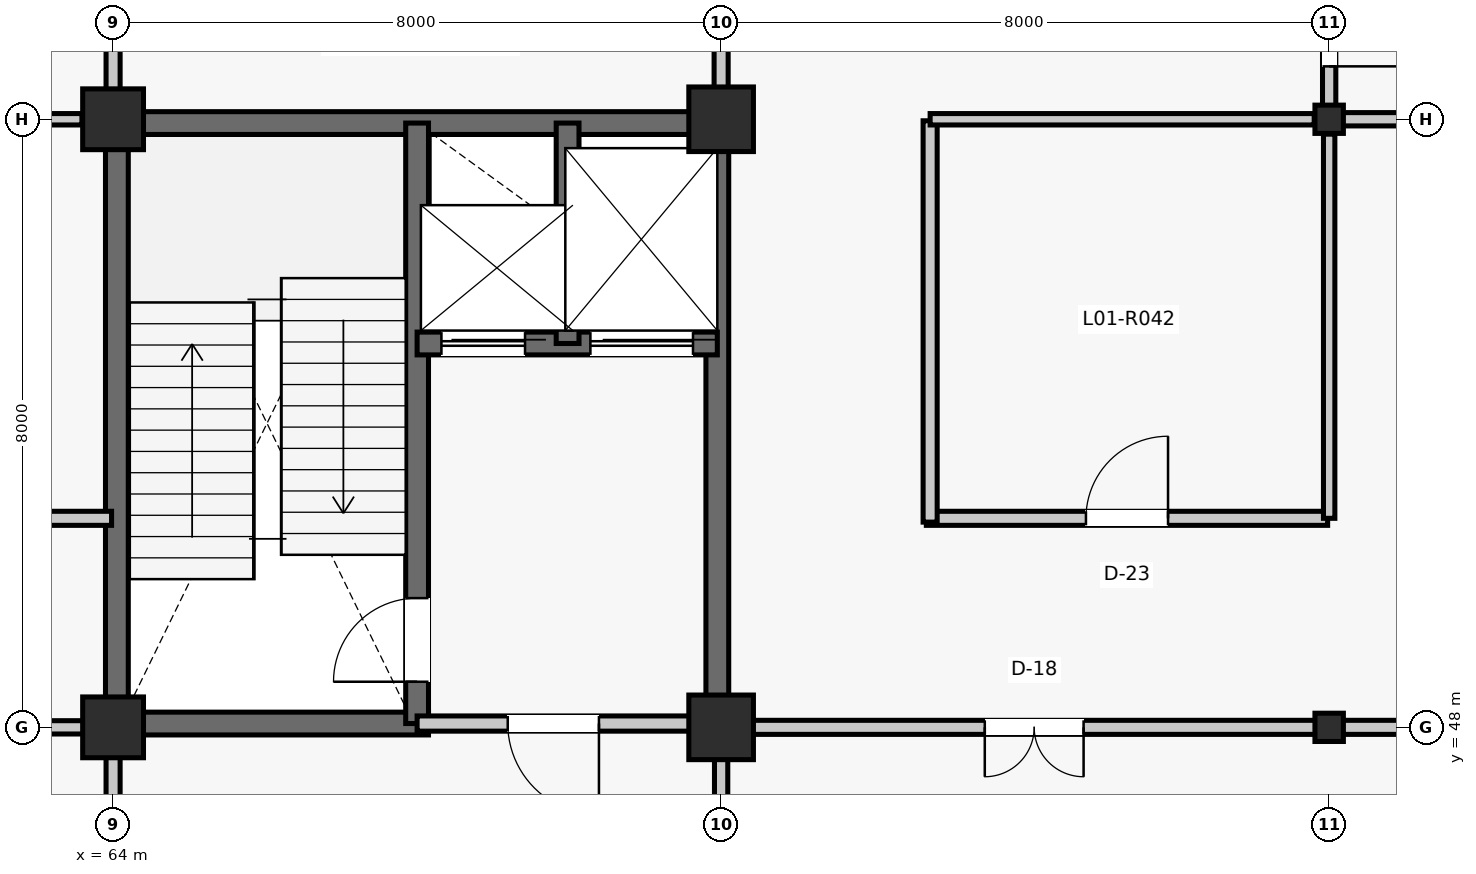
"""IFC4 building model, lengths in metres.
Left out: names, types, materials, properties, quantities, classifications, styles, units other than length and angle.
Written with IfcOpenShell. Run it as: python <this file> out.ifc"""

import sys

from ifc_helpers import new_model, si_unit, direction, frame, frame_2d, origin, origin_2d, place, context, subcontext, project, spatial, rectangle, i_section, extrude, element, fill, save


model = new_model("IFC4")
c1 = context("Model", 3, precision=1e-05, world=origin(), true_north=direction((0.0, 1.0)))
c2 = subcontext(c1, "Body", "Model", "MODEL_VIEW")
j1 = project(units=[si_unit("LENGTHUNIT", "METRE"), si_unit("PLANEANGLEUNIT", "RADIAN")], contexts=[c1])
p1 = place(None, origin())
s1 = spatial("IfcSite", under=j1, at=p1, CompositionType="ELEMENT")
p2 = place(p1, origin())
s2 = spatial("IfcBuilding", under=s1, at=p2, CompositionType="ELEMENT")
p3 = place(p2, frame((0.0, 0.0, 5.28)))
s3 = spatial("IfcBuildingStorey", under=s2, at=p3, CompositionType="ELEMENT", Elevation=5.28)
for number, where, z_axis, x_axis in (
    (1, (64.0, 48.0, 0.0), (0.0, 0.0, 1.0), (1.0, 0.0, 0.0)),
    (2, (64.0, 56.0, 0.0), (0.0, 0.0, 1.0), (1.0, 0.0, 0.0)),
):
    element("IfcColumn", number, at=place(p3, frame(where, z_axis=z_axis, x_axis=x_axis)), inside=s3, PredefinedType="COLUMN", context=c2, shape_type="SweptSolid", body=[
        extrude(rectangle(XDim=0.8, YDim=0.8, at=origin_2d()), origin(), (0.0, 0.0, 1.0), 4.62),
    ])
for number, where, z_axis, x_axis in (
    (3, (72.0, 48.0, 0.0), (0.0, 0.0, 1.0), (1.0, 0.0, 0.0)),
    (4, (72.0, 56.0, 0.0), (0.0, 0.0, 1.0), (1.0, 0.0, 0.0)),
):
    element("IfcColumn", number, at=place(p3, frame(where, z_axis=z_axis, x_axis=x_axis)), inside=s3, PredefinedType="COLUMN", context=c2, shape_type="SweptSolid", body=[
        extrude(rectangle(XDim=0.85, YDim=0.85, at=origin_2d()), origin(), (0.0, 0.0, 1.0), 4.62),
    ])
for number, where, z_axis, x_axis in (
    (5, (80.0, 48.0, 0.0), (0.0, 0.0, 1.0), (1.0, 0.0, 0.0)),
    (6, (80.0, 56.0, 0.0), (0.0, 0.0, 1.0), (1.0, 0.0, 0.0)),
):
    element("IfcColumn", number, at=place(p3, frame(where, z_axis=z_axis, x_axis=x_axis)), inside=s3, PredefinedType="COLUMN", context=c2, shape_type="SweptSolid", body=[
        extrude(i_section(OverallWidth=0.374, OverallDepth=0.372, WebThickness=0.016, FlangeThickness=0.026, FilletRadius=0.015, at=origin_2d()), origin(), (0.0, 0.0, 1.0), 4.62),
    ])
p4 = place(p3, frame((64.05, 48.29, 0.0), z_axis=(0.0, 0.0, 1.0), x_axis=(0.0, 1.0, 0.0)))
e7 = element("IfcWall", 7, at=p4, inside=s3, PredefinedType="SHEAR", context=c2, shape_type="SweptSolid", body=[
    extrude(rectangle(XDim=7.42, YDim=0.3, at=frame_2d((3.71, 0.0))), origin(), (0.0, 0.0, 1.0), 4.335),
])
p5 = place(p3, frame((64.29, 55.95, 0.0), z_axis=(0.0, 0.0, 1.0), x_axis=(1.0, 0.0, 0.0)))
e8 = element("IfcWall", 8, at=p5, inside=s3, PredefinedType="SHEAR", context=c2, shape_type="SweptSolid", body=[
    extrude(rectangle(XDim=7.395, YDim=0.3, at=frame_2d((3.698, 0.0))), origin(), (0.0, 0.0, 1.0), 4.335),
])
p6 = place(p3, frame((71.95, 48.315, 0.0), z_axis=(0.0, 0.0, 1.0), x_axis=(0.0, 1.0, 0.0)))
e9 = element("IfcWall", 9, at=p6, inside=s3, PredefinedType="SHEAR", context=c2, shape_type="SweptSolid", body=[
    extrude(rectangle(XDim=7.37, YDim=0.3, at=frame_2d((3.685, 0.0))), origin(), (0.0, 0.0, 1.0), 4.335),
])
p7 = place(p3, frame((64.29, 48.05, 0.0), z_axis=(0.0, 0.0, 1.0), x_axis=(1.0, 0.0, 0.0)))
e10 = element("IfcWall", 10, at=p7, inside=s3, PredefinedType="SHEAR", context=c2, shape_type="SweptSolid", body=[
    extrude(rectangle(XDim=3.86, YDim=0.3, at=frame_2d((1.93, 0.0))), origin(), (0.0, 0.0, 1.0), 4.335),
])
p8 = place(p3, frame((68.0, 48.05, 0.0), z_axis=(0.0, 0.0, 1.0), x_axis=(0.0, 1.0, 0.0)))
e11 = element("IfcWall", 11, at=p8, inside=s3, PredefinedType="SHEAR", context=c2, shape_type="SweptSolid", body=[
    extrude(rectangle(XDim=7.9, YDim=0.3, at=frame_2d((3.95, 0.0))), origin(), (0.0, 0.0, 1.0), 4.335),
])
p9 = place(p8, frame((0.55, 0.0, 0.0)))
e12 = element("IfcOpeningElement", 12, at=p9, cuts=e11, PredefinedType="OPENING", context=c2, shape_type="SweptSolid", body=[
    extrude(rectangle(XDim=1.1, YDim=2.15, at=frame_2d((0.55, 1.075))), frame((0.0, 0.16, 0.0), z_axis=(0.0, -1.0, 0.0), x_axis=(1.0, 0.0, 0.0)), (0.0, 0.0, 1.0), 0.32),
])
p10 = place(p3, frame((68.0, 53.05, 0.0), z_axis=(0.0, 0.0, 1.0), x_axis=(1.0, 0.0, 0.0)))
e13 = element("IfcWall", 13, at=p10, inside=s3, PredefinedType="SHEAR", context=c2, shape_type="SweptSolid", body=[
    extrude(rectangle(XDim=3.95, YDim=0.3, at=frame_2d((1.975, 0.0))), origin(), (0.0, 0.0, 1.0), 4.335),
])
p11 = place(p10, frame((0.32, 0.0, 0.0)))
e14 = element("IfcOpeningElement", 14, at=p11, cuts=e13, PredefinedType="OPENING", context=c2, shape_type="SweptSolid", body=[
    extrude(rectangle(XDim=1.1, YDim=2.2, at=frame_2d((0.55, 1.1))), frame((0.0, 0.16, 0.0), z_axis=(0.0, -1.0, 0.0), x_axis=(1.0, 0.0, 0.0)), (0.0, 0.0, 1.0), 0.32),
])
p12 = place(p10, frame((2.28, 0.0, 0.0)))
e15 = element("IfcOpeningElement", 15, at=p12, cuts=e13, PredefinedType="OPENING", context=c2, shape_type="SweptSolid", body=[
    extrude(rectangle(XDim=1.35, YDim=2.3, at=frame_2d((0.675, 1.15))), frame((0.0, 0.16, 0.0), z_axis=(0.0, -1.0, 0.0), x_axis=(1.0, 0.0, 0.0)), (0.0, 0.0, 1.0), 0.32),
])
p13 = place(p3, frame((69.98, 53.05, 0.0), z_axis=(0.0, 0.0, 1.0), x_axis=(0.0, 1.0, 0.0)))
e16 = element("IfcWall", 16, at=p13, inside=s3, PredefinedType="SHEAR", context=c2, shape_type="SweptSolid", body=[
    extrude(rectangle(XDim=2.9, YDim=0.3, at=frame_2d((1.45, 0.0))), origin(), (0.0, 0.0, 1.0), 4.335),
])
p14 = place(p3, frame((68.0, 48.05, 0.0), z_axis=(0.0, 0.0, 1.0), x_axis=(1.0, 0.0, 0.0)))
e17 = element("IfcWall", 17, at=p14, inside=s3, PredefinedType="PARTITIONING", context=c2, shape_type="SweptSolid", body=[
    extrude(rectangle(XDim=3.585, YDim=0.2, at=frame_2d((1.792, 0.0))), origin(), (0.0, 0.0, 1.0), 3.771),
])
p15 = place(p14, frame((1.192, 0.0, 0.0)))
e18 = element("IfcOpeningElement", 18, at=p15, cuts=e17, PredefinedType="OPENING", context=c2, shape_type="SweptSolid", body=[
    extrude(rectangle(XDim=1.2, YDim=2.15, at=frame_2d((0.6, 1.075))), frame((0.0, 0.11, 0.0), z_axis=(0.0, -1.0, 0.0), x_axis=(1.0, 0.0, 0.0)), (0.0, 0.0, 1.0), 0.22),
])
p16 = place(p3, frame((58.7, 50.75, 0.0), z_axis=(0.0, 0.0, 1.0), x_axis=(1.0, 0.0, 0.0)))
e19 = element("IfcWall", 19, at=p16, inside=s3, PredefinedType="PARTITIONING", context=c2, shape_type="SweptSolid", body=[
    extrude(rectangle(XDim=5.28, YDim=0.185, at=frame_2d((2.64, 0.0))), origin(), (0.0, 0.0, 1.0), 3.781),
])
p17 = place(p16, frame((2.16, 0.0, 0.0)))
e20 = element("IfcOpeningElement", 20, at=p17, cuts=e19, PredefinedType="OPENING", context=c2, shape_type="SweptSolid", body=[
    extrude(rectangle(XDim=0.96, YDim=2.14, at=frame_2d((0.48, 1.07))), frame((0.0, 0.103, 0.0), z_axis=(0.0, -1.0, 0.0), x_axis=(1.0, 0.0, 0.0)), (0.0, 0.0, 1.0), 0.205),
])
p18 = place(p3, frame((58.75, 56.0, 0.0), z_axis=(0.0, 0.0, 1.0), x_axis=(1.0, 0.0, 0.0)))
e21 = element("IfcWall", 21, at=p18, inside=s3, PredefinedType="PARTITIONING", context=c2, shape_type="SweptSolid", body=[
    extrude(rectangle(XDim=4.84, YDim=0.15, at=frame_2d((2.42, 0.0))), origin(), (0.0, 0.0, 1.0), 3.771),
])
p19 = place(p3, frame((74.7, 50.75, 0.0), z_axis=(0.0, 0.0, 1.0), x_axis=(1.0, 0.0, 0.0)))
e22 = element("IfcWall", 22, at=p19, inside=s3, PredefinedType="PARTITIONING", context=c2, shape_type="SweptSolid", body=[
    extrude(rectangle(XDim=5.28, YDim=0.185, at=frame_2d((2.64, 0.0))), origin(), (0.0, 0.0, 1.0), 3.787),
])
p20 = place(p19, frame((2.1, 0.0, 0.0)))
e23 = element("IfcOpeningElement", 23, at=p20, cuts=e22, PredefinedType="OPENING", context=c2, shape_type="SweptSolid", body=[
    extrude(rectangle(XDim=1.08, YDim=2.2, at=frame_2d((0.54, 1.1))), frame((0.0, 0.103, 0.0), z_axis=(0.0, -1.0, 0.0), x_axis=(1.0, 0.0, 0.0)), (0.0, 0.0, 1.0), 0.205),
])
p21 = place(p3, frame((74.75, 50.7, 0.0), z_axis=(0.0, 0.0, 1.0), x_axis=(0.0, 1.0, 0.0)))
e24 = element("IfcWall", 24, at=p21, inside=s3, PredefinedType="PARTITIONING", context=c2, shape_type="SweptSolid", body=[
    extrude(rectangle(XDim=5.28, YDim=0.185, at=frame_2d((2.64, 0.0))), origin(), (0.0, 0.0, 1.0), 3.712),
])
p22 = place(p3, frame((74.75, 56.0, 0.0), z_axis=(0.0, 0.0, 1.0), x_axis=(1.0, 0.0, 0.0)))
e25 = element("IfcWall", 25, at=p22, inside=s3, PredefinedType="PARTITIONING", context=c2, shape_type="SweptSolid", body=[
    extrude(rectangle(XDim=5.053, YDim=0.15, at=frame_2d((2.526, 0.0))), origin(), (0.0, 0.0, 1.0), 3.712),
])
p23 = place(p3, frame((80.0, 50.75, 0.0), z_axis=(0.0, 0.0, 1.0), x_axis=(0.0, 1.0, 0.0)))
e26 = element("IfcWall", 26, at=p23, inside=s3, PredefinedType="PARTITIONING", context=c2, shape_type="SweptSolid", body=[
    extrude(rectangle(XDim=5.054, YDim=0.15, at=frame_2d((2.527, 0.0))), origin(), (0.0, 0.0, 1.0), 3.787),
])
p24 = place(p3, frame((64.0, 40.29, 0.0), z_axis=(0.0, 0.0, 1.0), x_axis=(0.0, 1.0, 0.0)))
e27 = element("IfcWall", 27, at=p24, inside=s3, PredefinedType="PARTITIONING", context=c2, shape_type="SweptSolid", body=[
    extrude(rectangle(XDim=7.32, YDim=0.185, at=frame_2d((3.66, 0.0))), origin(), (0.0, 0.0, 1.0), 3.857),
])
p25 = place(p24, frame((3.035, 0.0, 0.0)))
e28 = element("IfcOpeningElement", 28, at=p25, cuts=e27, PredefinedType="OPENING", context=c2, shape_type="SweptSolid", body=[
    extrude(rectangle(XDim=1.25, YDim=2.18, at=frame_2d((0.625, 1.09))), frame((0.0, 0.103, 0.0), z_axis=(0.0, -1.0, 0.0), x_axis=(1.0, 0.0, 0.0)), (0.0, 0.0, 1.0), 0.205),
])
p26 = place(p3, frame((56.29, 48.0, 0.0), z_axis=(0.0, 0.0, 1.0), x_axis=(1.0, 0.0, 0.0)))
e29 = element("IfcWall", 29, at=p26, inside=s3, PredefinedType="PARTITIONING", context=c2, shape_type="SweptSolid", body=[
    extrude(rectangle(XDim=7.32, YDim=0.175, at=frame_2d((3.66, 0.0))), origin(), (0.0, 0.0, 1.0), 3.787),
])
p27 = place(p3, frame((64.0, 56.39, 0.0), z_axis=(0.0, 0.0, 1.0), x_axis=(0.0, 1.0, 0.0)))
e30 = element("IfcWall", 30, at=p27, inside=s3, PredefinedType="PARTITIONING", context=c2, shape_type="SweptSolid", body=[
    extrude(rectangle(XDim=7.32, YDim=0.185, at=frame_2d((3.66, 0.0))), origin(), (0.0, 0.0, 1.0), 3.851),
])
p28 = place(p27, frame((0.52, 0.0, 0.0)))
e31 = element("IfcOpeningElement", 31, at=p28, cuts=e30, PredefinedType="OPENING", context=c2, shape_type="SweptSolid", body=[
    extrude(rectangle(XDim=0.94, YDim=2.12, at=frame_2d((0.47, 1.06))), frame((0.0, 0.103, 0.0), z_axis=(0.0, -1.0, 0.0), x_axis=(1.0, 0.0, 0.0)), (0.0, 0.0, 1.0), 0.205),
])
p29 = place(p3, frame((72.0, 40.415, 0.0), z_axis=(0.0, 0.0, 1.0), x_axis=(0.0, 1.0, 0.0)))
e32 = element("IfcWall", 32, at=p29, inside=s3, PredefinedType="PARTITIONING", context=c2, shape_type="SweptSolid", body=[
    extrude(rectangle(XDim=7.17, YDim=0.175, at=frame_2d((3.585, 0.0))), origin(), (0.0, 0.0, 1.0), 3.781),
])
p30 = place(p29, frame((2.635, 0.0, 0.0)))
e33 = element("IfcOpeningElement", 33, at=p30, cuts=e32, PredefinedType="OPENING", context=c2, shape_type="SweptSolid", body=[
    extrude(rectangle(XDim=1.9, YDim=2.38, at=frame_2d((0.95, 1.19))), frame((0.0, 0.097, 0.0), z_axis=(0.0, -1.0, 0.0), x_axis=(1.0, 0.0, 0.0)), (0.0, 0.0, 1.0), 0.195),
])
p31 = place(p3, frame((72.0, 56.415, 0.0), z_axis=(0.0, 0.0, 1.0), x_axis=(0.0, 1.0, 0.0)))
e34 = element("IfcWall", 34, at=p31, inside=s3, PredefinedType="PARTITIONING", context=c2, shape_type="SweptSolid", body=[
    extrude(rectangle(XDim=7.17, YDim=0.185, at=frame_2d((3.585, 0.0))), origin(), (0.0, 0.0, 1.0), 3.787),
])
p32 = place(p3, frame((72.415, 48.0, 0.0), z_axis=(0.0, 0.0, 1.0), x_axis=(1.0, 0.0, 0.0)))
e35 = element("IfcWall", 35, at=p32, inside=s3, PredefinedType="PARTITIONING", context=c2, shape_type="SweptSolid", body=[
    extrude(rectangle(XDim=7.408, YDim=0.185, at=frame_2d((3.704, 0.0))), origin(), (0.0, 0.0, 1.0), 3.781),
])
p33 = place(p32, frame((3.054, 0.0, 0.0)))
e36 = element("IfcOpeningElement", 36, at=p33, cuts=e35, PredefinedType="OPENING", context=c2, shape_type="SweptSolid", body=[
    extrude(rectangle(XDim=1.3, YDim=2.2, at=frame_2d((0.65, 1.1))), frame((0.0, 0.103, 0.0), z_axis=(0.0, -1.0, 0.0), x_axis=(1.0, 0.0, 0.0)), (0.0, 0.0, 1.0), 0.205),
])
p34 = place(p3, frame((80.0, 56.176, 0.0), z_axis=(0.0, 0.0, 1.0), x_axis=(0.0, 1.0, 0.0)))
e37 = element("IfcWall", 37, at=p34, inside=s3, PredefinedType="PARTITIONING", context=c2, shape_type="SweptSolid", body=[
    extrude(rectangle(XDim=7.648, YDim=0.175, at=frame_2d((3.824, 0.0))), origin(), (0.0, 0.0, 1.0), 3.857),
])
p35 = place(p34, frame((0.52, 0.0, 0.0)))
e38 = element("IfcOpeningElement", 38, at=p35, cuts=e37, PredefinedType="OPENING", context=c2, shape_type="SweptSolid", body=[
    extrude(rectangle(XDim=0.94, YDim=2.12, at=frame_2d((0.47, 1.06))), frame((0.0, 0.097, 0.0), z_axis=(0.0, -1.0, 0.0), x_axis=(1.0, 0.0, 0.0)), (0.0, 0.0, 1.0), 0.195),
])
p36 = place(p3, frame((80.177, 48.0, 0.0), z_axis=(0.0, 0.0, 1.0), x_axis=(1.0, 0.0, 0.0)))
e39 = element("IfcWall", 39, at=p36, inside=s3, PredefinedType="PARTITIONING", context=c2, shape_type="SweptSolid", body=[
    extrude(rectangle(XDim=7.823, YDim=0.185, at=frame_2d((3.912, 0.0))), origin(), (0.0, 0.0, 1.0), 3.469),
])
p37 = place(p36, frame((3.261, 0.0, 0.0)))
e40 = element("IfcOpeningElement", 40, at=p37, cuts=e39, PredefinedType="OPENING", context=c2, shape_type="SweptSolid", body=[
    extrude(rectangle(XDim=1.3, YDim=2.2, at=frame_2d((0.65, 1.1))), frame((0.0, 0.103, 0.0), z_axis=(0.0, -1.0, 0.0), x_axis=(1.0, 0.0, 0.0)), (0.0, 0.0, 1.0), 0.205),
])
p38 = place(p3, frame((80.177, 56.0, 0.0), z_axis=(0.0, 0.0, 1.0), x_axis=(1.0, 0.0, 0.0)))
e41 = element("IfcWall", 41, at=p38, inside=s3, PredefinedType="PARTITIONING", context=c2, shape_type="SweptSolid", body=[
    extrude(rectangle(XDim=7.823, YDim=0.175, at=frame_2d((3.912, 0.0))), origin(), (0.0, 0.0, 1.0), 3.55),
])
p39 = place(p9, origin())
e42 = element("IfcDoor", 42, at=p39, inside=s3, OperationType="SINGLE_SWING_LEFT", PredefinedType="DOOR", context=c2, shape_type="SweptSolid", body=[
    extrude(rectangle(XDim=1.1, YDim=2.15, at=frame_2d((0.55, 1.075))), frame((0.0, 0.025, 0.0), z_axis=(0.0, -1.0, 0.0), x_axis=(1.0, 0.0, 0.0)), (0.0, 0.0, 1.0), 0.05),
])
fill(e12, e42)
p40 = place(p11, origin())
e43 = element("IfcDoor", 43, at=p40, inside=s3, OperationType="SLIDING_TO_LEFT", PredefinedType="DOOR", context=c2, shape_type="SweptSolid", body=[
    extrude(rectangle(XDim=1.1, YDim=2.2, at=frame_2d((0.55, 1.1))), frame((0.0, 0.025, 0.0), z_axis=(0.0, -1.0, 0.0), x_axis=(1.0, 0.0, 0.0)), (0.0, 0.0, 1.0), 0.05),
])
fill(e14, e43)
p41 = place(p12, origin())
e44 = element("IfcDoor", 44, at=p41, inside=s3, OperationType="DOUBLE_DOOR_SLIDING", PredefinedType="DOOR", context=c2, shape_type="SweptSolid", body=[
    extrude(rectangle(XDim=1.35, YDim=2.3, at=frame_2d((0.675, 1.15))), frame((0.0, 0.025, 0.0), z_axis=(0.0, -1.0, 0.0), x_axis=(1.0, 0.0, 0.0)), (0.0, 0.0, 1.0), 0.05),
])
fill(e15, e44)
p42 = place(p15, frame((1.2, 0.0, 0.0), z_axis=(0.0, 0.0, 1.0), x_axis=(-1.0, 0.0, 0.0)))
e45 = element("IfcDoor", 45, at=p42, inside=s3, OperationType="SINGLE_SWING_RIGHT", PredefinedType="DOOR", context=c2, shape_type="SweptSolid", body=[
    extrude(rectangle(XDim=1.2, YDim=2.15, at=frame_2d((0.6, 1.075))), frame((0.0, 0.025, 0.0), z_axis=(0.0, -1.0, 0.0), x_axis=(1.0, 0.0, 0.0)), (0.0, 0.0, 1.0), 0.05),
])
fill(e18, e45)
p43 = place(p20, origin())
e46 = element("IfcDoor", 46, at=p43, inside=s3, OperationType="SINGLE_SWING_RIGHT", PredefinedType="DOOR", context=c2, shape_type="SweptSolid", body=[
    extrude(rectangle(XDim=1.08, YDim=2.2, at=frame_2d((0.54, 1.1))), frame((0.0, 0.025, 0.0), z_axis=(0.0, -1.0, 0.0), x_axis=(1.0, 0.0, 0.0)), (0.0, 0.0, 1.0), 0.05),
])
fill(e23, e46)
p44 = place(p33, frame((1.3, 0.0, 0.0), z_axis=(0.0, 0.0, 1.0), x_axis=(-1.0, 0.0, 0.0)))
e47 = element("IfcDoor", 47, at=p44, inside=s3, OperationType="DOUBLE_DOOR_SINGLE_SWING", PredefinedType="DOOR", context=c2, shape_type="SweptSolid", body=[
    extrude(rectangle(XDim=1.3, YDim=2.2, at=frame_2d((0.65, 1.1))), frame((0.0, 0.025, 0.0), z_axis=(0.0, -1.0, 0.0), x_axis=(1.0, 0.0, 0.0)), (0.0, 0.0, 1.0), 0.05),
])
fill(e36, e47)
p45 = place(p35, frame((0.94, 0.0, 0.0), z_axis=(0.0, 0.0, 1.0), x_axis=(-1.0, 0.0, 0.0)))
e48 = element("IfcDoor", 48, at=p45, inside=s3, OperationType="SINGLE_SWING_LEFT", PredefinedType="DOOR", context=c2, shape_type="SweptSolid", body=[
    extrude(rectangle(XDim=0.94, YDim=2.12, at=frame_2d((0.47, 1.06))), frame((0.0, 0.025, 0.0), z_axis=(0.0, -1.0, 0.0), x_axis=(1.0, 0.0, 0.0)), (0.0, 0.0, 1.0), 0.05),
])
fill(e38, e48)
save(model, sys.argv[1])
